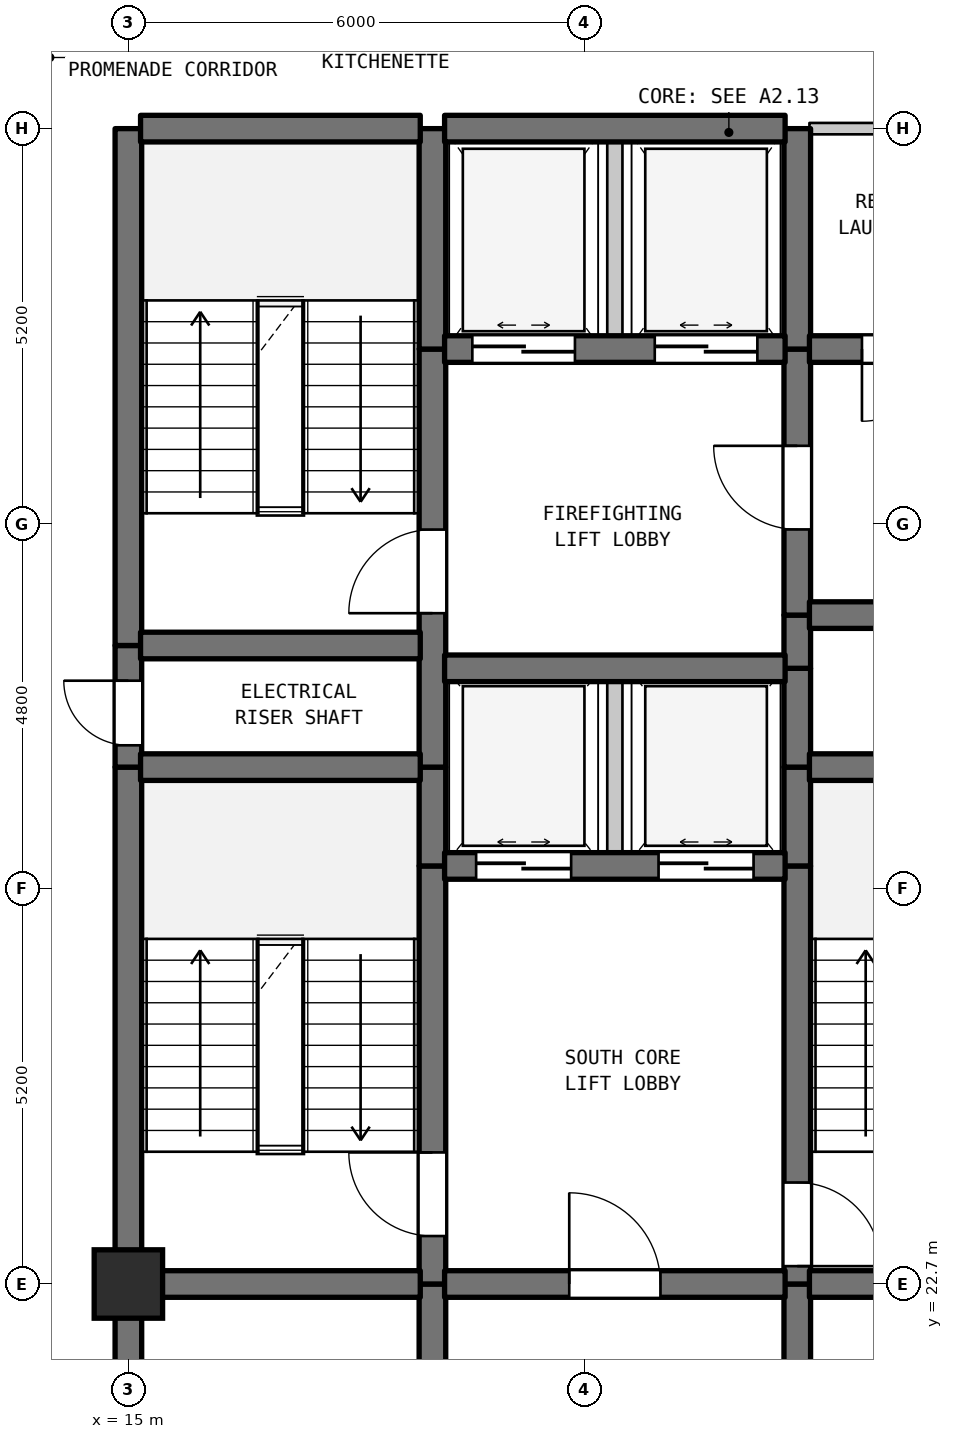
"""IFC4 building model, lengths in metres.
Left out: names, types, materials, properties, quantities, classifications, styles, units other than length and angle.
Written with IfcOpenShell. Run it as: python <this file> out.ifc"""

import sys

from ifc_helpers import new_model, si_unit, direction, frame, frame_2d, origin, origin_2d, place, context, subcontext, project, spatial, rectangle, extrude, element, fill, save


model = new_model("IFC4")
c1 = context("Model", 3, precision=1e-05, world=origin(), true_north=direction((0.0, 1.0)))
c2 = subcontext(c1, "Body", "Model", "MODEL_VIEW")
j1 = project(units=[si_unit("LENGTHUNIT", "METRE"), si_unit("PLANEANGLEUNIT", "RADIAN")], contexts=[c1])
p1 = place(None, origin())
s1 = spatial("IfcSite", under=j1, at=p1, CompositionType="ELEMENT")
p2 = place(p1, origin())
s2 = spatial("IfcBuilding", under=s1, at=p2, CompositionType="ELEMENT")
p3 = place(p2, frame((0.0, 0.0, 152.0)))
s3 = spatial("IfcBuildingStorey", under=s2, at=p3, CompositionType="ELEMENT", Elevation=152.0)
p4 = place(p3, frame((15.0, 22.7, 0.0), z_axis=(0.0, 0.0, 1.0), x_axis=(1.0, 0.0, 0.0)))
e1 = element("IfcColumn", 1, at=p4, inside=s3, PredefinedType="COLUMN", context=c2, shape_type="SweptSolid", body=[
    extrude(rectangle(XDim=0.9, YDim=0.9, at=origin_2d()), origin(), (0.0, 0.0, 1.0), 3.7),
])
p5 = place(p3, frame((15.0, 19.5, 0.0), z_axis=(0.0, 0.0, 1.0), x_axis=(0.0, 1.0, 0.0)))
e2 = element("IfcWall", 2, at=p5, inside=s3, PredefinedType="SHEAR", context=c2, shape_type="SweptSolid", body=[
    extrude(rectangle(XDim=3.2, YDim=0.35, at=frame_2d((1.6, 0.0))), origin(), (0.0, 0.0, 1.0), 3.385),
])
p6 = place(p3, frame((15.0, 22.7, 0.0), z_axis=(0.0, 0.0, 1.0), x_axis=(0.0, 1.0, 0.0)))
e3 = element("IfcWall", 3, at=p6, inside=s3, PredefinedType="SHEAR", context=c2, shape_type="SweptSolid", body=[
    extrude(rectangle(XDim=6.8, YDim=0.35, at=frame_2d((3.4, 0.0))), origin(), (0.0, 0.0, 1.0), 3.385),
])
p7 = place(p3, frame((15.0, 29.5, 0.0), z_axis=(0.0, 0.0, 1.0), x_axis=(0.0, 1.0, 0.0)))
e4 = element("IfcWall", 4, at=p7, inside=s3, PredefinedType="SHEAR", context=c2, shape_type="SweptSolid", body=[
    extrude(rectangle(XDim=1.6, YDim=0.35, at=frame_2d((0.8, 0.0))), origin(), (0.0, 0.0, 1.0), 3.385),
])
p8 = place(p7, frame((0.287, 0.0, 0.0)))
e5 = element("IfcOpeningElement", 5, at=p8, cuts=e4, PredefinedType="OPENING", context=c2, shape_type="SweptSolid", body=[
    extrude(rectangle(XDim=0.85, YDim=2.1, at=frame_2d((0.425, 1.05))), frame((0.0, 0.185, 0.0), z_axis=(0.0, -1.0, 0.0), x_axis=(1.0, 0.0, 0.0)), (0.0, 0.0, 1.0), 0.37),
])
p9 = place(p3, frame((15.0, 31.1, 0.0), z_axis=(0.0, 0.0, 1.0), x_axis=(0.0, 1.0, 0.0)))
e6 = element("IfcWall", 6, at=p9, inside=s3, PredefinedType="SHEAR", context=c2, shape_type="SweptSolid", body=[
    extrude(rectangle(XDim=6.8, YDim=0.35, at=frame_2d((3.4, 0.0))), origin(), (0.0, 0.0, 1.0), 3.385),
])
p10 = place(p3, frame((19.0, 19.5, 0.0), z_axis=(0.0, 0.0, 1.0), x_axis=(0.0, 1.0, 0.0)))
e7 = element("IfcWall", 7, at=p10, inside=s3, PredefinedType="SHEAR", context=c2, shape_type="SweptSolid", body=[
    extrude(rectangle(XDim=3.2, YDim=0.35, at=frame_2d((1.6, 0.0))), origin(), (0.0, 0.0, 1.0), 3.385),
])
p11 = place(p3, frame((19.0, 22.7, 0.0), z_axis=(0.0, 0.0, 1.0), x_axis=(0.0, 1.0, 0.0)))
e8 = element("IfcWall", 8, at=p11, inside=s3, PredefinedType="SHEAR", context=c2, shape_type="SweptSolid", body=[
    extrude(rectangle(XDim=5.5, YDim=0.35, at=frame_2d((2.75, 0.0))), origin(), (0.0, 0.0, 1.0), 3.385),
])
p12 = place(p11, frame((0.631, 0.0, 0.0)))
e9 = element("IfcOpeningElement", 9, at=p12, cuts=e8, PredefinedType="OPENING", context=c2, shape_type="SweptSolid", body=[
    extrude(rectangle(XDim=1.1, YDim=2.15, at=frame_2d((0.55, 1.075))), frame((0.0, 0.185, 0.0), z_axis=(0.0, -1.0, 0.0), x_axis=(1.0, 0.0, 0.0)), (0.0, 0.0, 1.0), 0.37),
])
p13 = place(p3, frame((19.0, 28.2, 0.0), z_axis=(0.0, 0.0, 1.0), x_axis=(0.0, 1.0, 0.0)))
e10 = element("IfcWall", 10, at=p13, inside=s3, PredefinedType="SHEAR", context=c2, shape_type="SweptSolid", body=[
    extrude(rectangle(XDim=1.3, YDim=0.35, at=frame_2d((0.65, 0.0))), origin(), (0.0, 0.0, 1.0), 3.385),
])
p14 = place(p3, frame((19.0, 29.5, 0.0), z_axis=(0.0, 0.0, 1.0), x_axis=(0.0, 1.0, 0.0)))
e11 = element("IfcWall", 11, at=p14, inside=s3, PredefinedType="SHEAR", context=c2, shape_type="SweptSolid", body=[
    extrude(rectangle(XDim=5.5, YDim=0.35, at=frame_2d((2.75, 0.0))), origin(), (0.0, 0.0, 1.0), 3.385),
])
p15 = place(p14, frame((2.025, 0.0, 0.0)))
e12 = element("IfcOpeningElement", 12, at=p15, cuts=e11, PredefinedType="OPENING", context=c2, shape_type="SweptSolid", body=[
    extrude(rectangle(XDim=1.1, YDim=2.15, at=frame_2d((0.55, 1.075))), frame((0.0, 0.185, 0.0), z_axis=(0.0, -1.0, 0.0), x_axis=(1.0, 0.0, 0.0)), (0.0, 0.0, 1.0), 0.37),
])
p16 = place(p3, frame((19.0, 35.0, 0.0), z_axis=(0.0, 0.0, 1.0), x_axis=(0.0, 1.0, 0.0)))
e13 = element("IfcWall", 13, at=p16, inside=s3, PredefinedType="SHEAR", context=c2, shape_type="SweptSolid", body=[
    extrude(rectangle(XDim=2.9, YDim=0.35, at=frame_2d((1.45, 0.0))), origin(), (0.0, 0.0, 1.0), 3.385),
])
p17 = place(p3, frame((21.4, 28.2, 0.0), z_axis=(0.0, 0.0, 1.0), x_axis=(0.0, 1.0, 0.0)))
e14 = element("IfcWall", 14, at=p17, inside=s3, PredefinedType="STANDARD", context=c2, shape_type="SweptSolid", body=[
    extrude(rectangle(XDim=2.6, YDim=0.2, at=frame_2d((1.3, 0.0))), origin(), (0.0, 0.0, 1.0), 3.385),
])
p18 = place(p3, frame((21.4, 35.0, 0.0), z_axis=(0.0, 0.0, 1.0), x_axis=(0.0, 1.0, 0.0)))
e15 = element("IfcWall", 15, at=p18, inside=s3, PredefinedType="STANDARD", context=c2, shape_type="SweptSolid", body=[
    extrude(rectangle(XDim=2.9, YDim=0.2, at=frame_2d((1.45, 0.0))), origin(), (0.0, 0.0, 1.0), 3.385),
])
p19 = place(p3, frame((23.8, 19.5, 0.0), z_axis=(0.0, 0.0, 1.0), x_axis=(0.0, 1.0, 0.0)))
e16 = element("IfcWall", 16, at=p19, inside=s3, PredefinedType="SHEAR", context=c2, shape_type="SweptSolid", body=[
    extrude(rectangle(XDim=3.2, YDim=0.35, at=frame_2d((1.6, 0.0))), origin(), (0.0, 0.0, 1.0), 3.385),
])
p20 = place(p3, frame((23.8, 22.7, 0.0), z_axis=(0.0, 0.0, 1.0), x_axis=(0.0, 1.0, 0.0)))
e17 = element("IfcWall", 17, at=p20, inside=s3, PredefinedType="SHEAR", context=c2, shape_type="SweptSolid", body=[
    extrude(rectangle(XDim=5.5, YDim=0.35, at=frame_2d((2.75, 0.0))), origin(), (0.0, 0.0, 1.0), 3.385),
])
p21 = place(p20, frame((0.235, 0.0, 0.0)))
e18 = element("IfcOpeningElement", 18, at=p21, cuts=e17, PredefinedType="OPENING", context=c2, shape_type="SweptSolid", body=[
    extrude(rectangle(XDim=1.1, YDim=2.15, at=frame_2d((0.55, 1.075))), frame((0.0, 0.185, 0.0), z_axis=(0.0, -1.0, 0.0), x_axis=(1.0, 0.0, 0.0)), (0.0, 0.0, 1.0), 0.37),
])
for number, where, z_axis, x_axis in (
    (19, (23.8, 28.2, 0.0), (0.0, 0.0, 1.0), (0.0, 1.0, 0.0)),
    (20, (23.8, 29.5, 0.0), (0.0, 0.0, 1.0), (0.0, 1.0, 0.0)),
):
    element("IfcWall", number, at=place(p3, frame(where, z_axis=z_axis, x_axis=x_axis)), inside=s3, PredefinedType="SHEAR", context=c2, shape_type="SweptSolid", body=[
        extrude(rectangle(XDim=1.3, YDim=0.35, at=frame_2d((0.65, 0.0))), origin(), (0.0, 0.0, 1.0), 3.385),
    ])
p22 = place(p3, frame((23.8, 30.8, 0.0), z_axis=(0.0, 0.0, 1.0), x_axis=(0.0, 1.0, 0.0)))
e21 = element("IfcWall", 21, at=p22, inside=s3, PredefinedType="SHEAR", context=c2, shape_type="SweptSolid", body=[
    extrude(rectangle(XDim=0.7, YDim=0.35, at=frame_2d((0.35, 0.0))), origin(), (0.0, 0.0, 1.0), 3.385),
])
p23 = place(p3, frame((23.8, 31.5, 0.0), z_axis=(0.0, 0.0, 1.0), x_axis=(0.0, 1.0, 0.0)))
e22 = element("IfcWall", 22, at=p23, inside=s3, PredefinedType="SHEAR", context=c2, shape_type="SweptSolid", body=[
    extrude(rectangle(XDim=3.5, YDim=0.35, at=frame_2d((1.75, 0.0))), origin(), (0.0, 0.0, 1.0), 3.385),
])
p24 = place(p23, frame((1.127, 0.0, 0.0)))
e23 = element("IfcOpeningElement", 23, at=p24, cuts=e22, PredefinedType="OPENING", context=c2, shape_type="SweptSolid", body=[
    extrude(rectangle(XDim=1.1, YDim=2.15, at=frame_2d((0.55, 1.075))), frame((0.0, 0.185, 0.0), z_axis=(0.0, -1.0, 0.0), x_axis=(1.0, 0.0, 0.0)), (0.0, 0.0, 1.0), 0.37),
])
p25 = place(p3, frame((23.8, 35.0, 0.0), z_axis=(0.0, 0.0, 1.0), x_axis=(0.0, 1.0, 0.0)))
e24 = element("IfcWall", 24, at=p25, inside=s3, PredefinedType="SHEAR", context=c2, shape_type="SweptSolid", body=[
    extrude(rectangle(XDim=2.9, YDim=0.35, at=frame_2d((1.45, 0.0))), origin(), (0.0, 0.0, 1.0), 3.385),
])
p26 = place(p3, frame((15.16, 22.7, 0.0), z_axis=(0.0, 0.0, 1.0), x_axis=(1.0, 0.0, 0.0)))
e25 = element("IfcWall", 25, at=p26, inside=s3, PredefinedType="SHEAR", context=c2, shape_type="SweptSolid", body=[
    extrude(rectangle(XDim=3.68, YDim=0.35, at=frame_2d((1.84, 0.0))), origin(), (0.0, 0.0, 1.0), 3.385),
])
p27 = place(p3, frame((19.16, 22.7, 0.0), z_axis=(0.0, 0.0, 1.0), x_axis=(1.0, 0.0, 0.0)))
e26 = element("IfcWall", 26, at=p27, inside=s3, PredefinedType="SHEAR", context=c2, shape_type="SweptSolid", body=[
    extrude(rectangle(XDim=4.48, YDim=0.35, at=frame_2d((2.24, 0.0))), origin(), (0.0, 0.0, 1.0), 3.385),
])
p28 = place(p27, frame((1.64, 0.0, 0.0)))
e27 = element("IfcOpeningElement", 27, at=p28, cuts=e26, PredefinedType="OPENING", context=c2, shape_type="SweptSolid", body=[
    extrude(rectangle(XDim=1.2, YDim=2.2, at=frame_2d((0.6, 1.1))), frame((0.0, 0.185, 0.0), z_axis=(0.0, -1.0, 0.0), x_axis=(1.0, 0.0, 0.0)), (0.0, 0.0, 1.0), 0.37),
])
p29 = place(p3, frame((23.96, 22.7, 0.0), z_axis=(0.0, 0.0, 1.0), x_axis=(1.0, 0.0, 0.0)))
e28 = element("IfcWall", 28, at=p29, inside=s3, PredefinedType="SHEAR", context=c2, shape_type="SweptSolid", body=[
    extrude(rectangle(XDim=1.855, YDim=0.35, at=frame_2d((0.927, 0.0))), origin(), (0.0, 0.0, 1.0), 3.385),
])
p30 = place(p3, frame((19.16, 28.2, 0.0), z_axis=(0.0, 0.0, 1.0), x_axis=(1.0, 0.0, 0.0)))
e29 = element("IfcWall", 29, at=p30, inside=s3, PredefinedType="SHEAR", context=c2, shape_type="SweptSolid", body=[
    extrude(rectangle(XDim=4.48, YDim=0.35, at=frame_2d((2.24, 0.0))), origin(), (0.0, 0.0, 1.0), 3.385),
])
p31 = place(p30, frame((0.415, 0.0, 0.0)))
e30 = element("IfcOpeningElement", 30, at=p31, cuts=e29, PredefinedType="OPENING", context=c2, shape_type="SweptSolid", body=[
    extrude(rectangle(XDim=1.25, YDim=2.2, at=frame_2d((0.625, 1.1))), frame((0.0, 0.185, 0.0), z_axis=(0.0, -1.0, 0.0), x_axis=(1.0, 0.0, 0.0)), (0.0, 0.0, 1.0), 0.37),
])
p32 = place(p30, frame((2.815, 0.0, 0.0)))
e31 = element("IfcOpeningElement", 31, at=p32, cuts=e29, PredefinedType="OPENING", context=c2, shape_type="SweptSolid", body=[
    extrude(rectangle(XDim=1.25, YDim=2.2, at=frame_2d((0.625, 1.1))), frame((0.0, 0.185, 0.0), z_axis=(0.0, -1.0, 0.0), x_axis=(1.0, 0.0, 0.0)), (0.0, 0.0, 1.0), 0.37),
])
p33 = place(p3, frame((15.16, 29.5, 0.0), z_axis=(0.0, 0.0, 1.0), x_axis=(1.0, 0.0, 0.0)))
e32 = element("IfcWall", 32, at=p33, inside=s3, PredefinedType="SHEAR", context=c2, shape_type="SweptSolid", body=[
    extrude(rectangle(XDim=3.68, YDim=0.35, at=frame_2d((1.84, 0.0))), origin(), (0.0, 0.0, 1.0), 3.385),
])
p34 = place(p3, frame((23.96, 29.5, 0.0), z_axis=(0.0, 0.0, 1.0), x_axis=(1.0, 0.0, 0.0)))
e33 = element("IfcWall", 33, at=p34, inside=s3, PredefinedType="SHEAR", context=c2, shape_type="SweptSolid", body=[
    extrude(rectangle(XDim=3.18, YDim=0.35, at=frame_2d((1.59, 0.0))), origin(), (0.0, 0.0, 1.0), 3.385),
])
p35 = place(p3, frame((19.16, 30.8, 0.0), z_axis=(0.0, 0.0, 1.0), x_axis=(1.0, 0.0, 0.0)))
e34 = element("IfcWall", 34, at=p35, inside=s3, PredefinedType="SHEAR", context=c2, shape_type="SweptSolid", body=[
    extrude(rectangle(XDim=4.48, YDim=0.35, at=frame_2d((2.24, 0.0))), origin(), (0.0, 0.0, 1.0), 3.385),
])
p36 = place(p3, frame((15.16, 31.1, 0.0), z_axis=(0.0, 0.0, 1.0), x_axis=(1.0, 0.0, 0.0)))
e35 = element("IfcWall", 35, at=p36, inside=s3, PredefinedType="SHEAR", context=c2, shape_type="SweptSolid", body=[
    extrude(rectangle(XDim=3.68, YDim=0.35, at=frame_2d((1.84, 0.0))), origin(), (0.0, 0.0, 1.0), 3.385),
])
p37 = place(p3, frame((23.96, 31.5, 0.0), z_axis=(0.0, 0.0, 1.0), x_axis=(1.0, 0.0, 0.0)))
e36 = element("IfcWall", 36, at=p37, inside=s3, PredefinedType="SHEAR", context=c2, shape_type="SweptSolid", body=[
    extrude(rectangle(XDim=3.18, YDim=0.35, at=frame_2d((1.59, 0.0))), origin(), (0.0, 0.0, 1.0), 3.385),
])
p38 = place(p37, frame((1.094, 0.0, 0.0)))
e37 = element("IfcOpeningElement", 37, at=p38, cuts=e36, PredefinedType="OPENING", context=c2, shape_type="SweptSolid", body=[
    extrude(rectangle(XDim=0.85, YDim=2.1, at=frame_2d((0.425, 1.05))), frame((0.0, 0.185, 0.0), z_axis=(0.0, -1.0, 0.0), x_axis=(1.0, 0.0, 0.0)), (0.0, 0.0, 1.0), 0.37),
])
p39 = place(p3, frame((19.16, 35.0, 0.0), z_axis=(0.0, 0.0, 1.0), x_axis=(1.0, 0.0, 0.0)))
e38 = element("IfcWall", 38, at=p39, inside=s3, PredefinedType="SHEAR", context=c2, shape_type="SweptSolid", body=[
    extrude(rectangle(XDim=4.48, YDim=0.35, at=frame_2d((2.24, 0.0))), origin(), (0.0, 0.0, 1.0), 3.385),
])
p40 = place(p39, frame((0.365, 0.0, 0.0)))
e39 = element("IfcOpeningElement", 39, at=p40, cuts=e38, PredefinedType="OPENING", context=c2, shape_type="SweptSolid", body=[
    extrude(rectangle(XDim=1.35, YDim=2.2, at=frame_2d((0.675, 1.1))), frame((0.0, 0.185, 0.0), z_axis=(0.0, -1.0, 0.0), x_axis=(1.0, 0.0, 0.0)), (0.0, 0.0, 1.0), 0.37),
])
p41 = place(p39, frame((2.765, 0.0, 0.0)))
e40 = element("IfcOpeningElement", 40, at=p41, cuts=e38, PredefinedType="OPENING", context=c2, shape_type="SweptSolid", body=[
    extrude(rectangle(XDim=1.35, YDim=2.2, at=frame_2d((0.675, 1.1))), frame((0.0, 0.185, 0.0), z_axis=(0.0, -1.0, 0.0), x_axis=(1.0, 0.0, 0.0)), (0.0, 0.0, 1.0), 0.37),
])
p42 = place(p3, frame((23.96, 35.0, 0.0), z_axis=(0.0, 0.0, 1.0), x_axis=(1.0, 0.0, 0.0)))
e41 = element("IfcWall", 41, at=p42, inside=s3, PredefinedType="SHEAR", context=c2, shape_type="SweptSolid", body=[
    extrude(rectangle(XDim=2.595, YDim=0.35, at=frame_2d((1.297, 0.0))), origin(), (0.0, 0.0, 1.0), 3.385),
])
p43 = place(p42, frame((0.691, 0.0, 0.0)))
e42 = element("IfcOpeningElement", 42, at=p43, cuts=e41, PredefinedType="OPENING", context=c2, shape_type="SweptSolid", body=[
    extrude(rectangle(XDim=0.95, YDim=2.15, at=frame_2d((0.475, 1.075))), frame((0.0, 0.185, 0.0), z_axis=(0.0, -1.0, 0.0), x_axis=(1.0, 0.0, 0.0)), (0.0, 0.0, 1.0), 0.37),
])
p44 = place(p3, frame((15.16, 37.9, 0.0), z_axis=(0.0, 0.0, 1.0), x_axis=(1.0, 0.0, 0.0)))
e43 = element("IfcWall", 43, at=p44, inside=s3, PredefinedType="SHEAR", context=c2, shape_type="SweptSolid", body=[
    extrude(rectangle(XDim=3.68, YDim=0.35, at=frame_2d((1.84, 0.0))), origin(), (0.0, 0.0, 1.0), 3.385),
])
p45 = place(p3, frame((19.16, 37.9, 0.0), z_axis=(0.0, 0.0, 1.0), x_axis=(1.0, 0.0, 0.0)))
e44 = element("IfcWall", 44, at=p45, inside=s3, PredefinedType="SHEAR", context=c2, shape_type="SweptSolid", body=[
    extrude(rectangle(XDim=4.48, YDim=0.35, at=frame_2d((2.24, 0.0))), origin(), (0.0, 0.0, 1.0), 3.385),
])
p46 = place(p3, frame((23.96, 37.9, 0.0), z_axis=(0.0, 0.0, 1.0), x_axis=(1.0, 0.0, 0.0)))
e45 = element("IfcWall", 45, at=p46, inside=s3, PredefinedType="STANDARD", context=c2, shape_type="SweptSolid", body=[
    extrude(rectangle(XDim=2.595, YDim=0.15, at=frame_2d((1.297, 0.0))), origin(), (0.0, 0.0, 1.0), 2.885),
])
p47 = place(p8, origin())
e46 = element("IfcDoor", 46, at=p47, inside=s3, OperationType="SINGLE_SWING_RIGHT", PredefinedType="DOOR", context=c2, shape_type="SweptSolid", body=[
    extrude(rectangle(XDim=0.85, YDim=2.1, at=frame_2d((0.425, 1.05))), frame((0.0, 0.025, 0.0), z_axis=(0.0, -1.0, 0.0), x_axis=(1.0, 0.0, 0.0)), (0.0, 0.0, 1.0), 0.05),
])
fill(e5, e46)
p48 = place(p12, origin())
e47 = element("IfcDoor", 47, at=p48, inside=s3, OperationType="SINGLE_SWING_RIGHT", PredefinedType="DOOR", context=c2, shape_type="SweptSolid", body=[
    extrude(rectangle(XDim=1.1, YDim=2.15, at=frame_2d((0.55, 1.075))), frame((0.0, 0.025, 0.0), z_axis=(0.0, -1.0, 0.0), x_axis=(1.0, 0.0, 0.0)), (0.0, 0.0, 1.0), 0.05),
])
fill(e9, e47)
p49 = place(p15, origin())
e48 = element("IfcDoor", 48, at=p49, inside=s3, OperationType="SINGLE_SWING_LEFT", PredefinedType="DOOR", context=c2, shape_type="SweptSolid", body=[
    extrude(rectangle(XDim=1.1, YDim=2.15, at=frame_2d((0.55, 1.075))), frame((0.0, 0.025, 0.0), z_axis=(0.0, -1.0, 0.0), x_axis=(1.0, 0.0, 0.0)), (0.0, 0.0, 1.0), 0.05),
])
fill(e12, e48)
p50 = place(p21, frame((1.1, 0.0, 0.0), z_axis=(0.0, 0.0, 1.0), x_axis=(-1.0, 0.0, 0.0)))
e49 = element("IfcDoor", 49, at=p50, inside=s3, OperationType="SINGLE_SWING_LEFT", PredefinedType="DOOR", context=c2, shape_type="SweptSolid", body=[
    extrude(rectangle(XDim=1.1, YDim=2.15, at=frame_2d((0.55, 1.075))), frame((0.0, 0.025, 0.0), z_axis=(0.0, -1.0, 0.0), x_axis=(1.0, 0.0, 0.0)), (0.0, 0.0, 1.0), 0.05),
])
fill(e18, e49)
p51 = place(p24, origin())
e50 = element("IfcDoor", 50, at=p51, inside=s3, OperationType="SINGLE_SWING_RIGHT", PredefinedType="DOOR", context=c2, shape_type="SweptSolid", body=[
    extrude(rectangle(XDim=1.1, YDim=2.15, at=frame_2d((0.55, 1.075))), frame((0.0, 0.025, 0.0), z_axis=(0.0, -1.0, 0.0), x_axis=(1.0, 0.0, 0.0)), (0.0, 0.0, 1.0), 0.05),
])
fill(e23, e50)
p52 = place(p28, origin())
e51 = element("IfcDoor", 51, at=p52, inside=s3, OperationType="SINGLE_SWING_LEFT", PredefinedType="DOOR", context=c2, shape_type="SweptSolid", body=[
    extrude(rectangle(XDim=1.2, YDim=2.2, at=frame_2d((0.6, 1.1))), frame((0.0, 0.025, 0.0), z_axis=(0.0, -1.0, 0.0), x_axis=(1.0, 0.0, 0.0)), (0.0, 0.0, 1.0), 0.05),
])
fill(e27, e51)
p53 = place(p31, origin())
e52 = element("IfcDoor", 52, at=p53, inside=s3, OperationType="DOUBLE_DOOR_SLIDING", PredefinedType="DOOR", context=c2, shape_type="SweptSolid", body=[
    extrude(rectangle(XDim=1.25, YDim=2.2, at=frame_2d((0.625, 1.1))), frame((0.0, 0.025, 0.0), z_axis=(0.0, -1.0, 0.0), x_axis=(1.0, 0.0, 0.0)), (0.0, 0.0, 1.0), 0.05),
])
fill(e30, e52)
p54 = place(p32, origin())
e53 = element("IfcDoor", 53, at=p54, inside=s3, OperationType="DOUBLE_DOOR_SLIDING", PredefinedType="DOOR", context=c2, shape_type="SweptSolid", body=[
    extrude(rectangle(XDim=1.25, YDim=2.2, at=frame_2d((0.625, 1.1))), frame((0.0, 0.025, 0.0), z_axis=(0.0, -1.0, 0.0), x_axis=(1.0, 0.0, 0.0)), (0.0, 0.0, 1.0), 0.05),
])
fill(e31, e53)
p55 = place(p40, origin())
e54 = element("IfcDoor", 54, at=p55, inside=s3, OperationType="DOUBLE_DOOR_SLIDING", PredefinedType="DOOR", context=c2, shape_type="SweptSolid", body=[
    extrude(rectangle(XDim=1.35, YDim=2.2, at=frame_2d((0.675, 1.1))), frame((0.0, 0.025, 0.0), z_axis=(0.0, -1.0, 0.0), x_axis=(1.0, 0.0, 0.0)), (0.0, 0.0, 1.0), 0.05),
])
fill(e39, e54)
p56 = place(p41, origin())
e55 = element("IfcDoor", 55, at=p56, inside=s3, OperationType="DOUBLE_DOOR_SLIDING", PredefinedType="DOOR", context=c2, shape_type="SweptSolid", body=[
    extrude(rectangle(XDim=1.35, YDim=2.2, at=frame_2d((0.675, 1.1))), frame((0.0, 0.025, 0.0), z_axis=(0.0, -1.0, 0.0), x_axis=(1.0, 0.0, 0.0)), (0.0, 0.0, 1.0), 0.05),
])
fill(e40, e55)
p57 = place(p43, frame((0.95, 0.0, 0.0), z_axis=(0.0, 0.0, 1.0), x_axis=(-1.0, 0.0, 0.0)))
e56 = element("IfcDoor", 56, at=p57, inside=s3, OperationType="SINGLE_SWING_LEFT", PredefinedType="DOOR", context=c2, shape_type="SweptSolid", body=[
    extrude(rectangle(XDim=0.95, YDim=2.15, at=frame_2d((0.475, 1.075))), frame((0.0, 0.025, 0.0), z_axis=(0.0, -1.0, 0.0), x_axis=(1.0, 0.0, 0.0)), (0.0, 0.0, 1.0), 0.05),
])
fill(e42, e56)
save(model, sys.argv[1])
